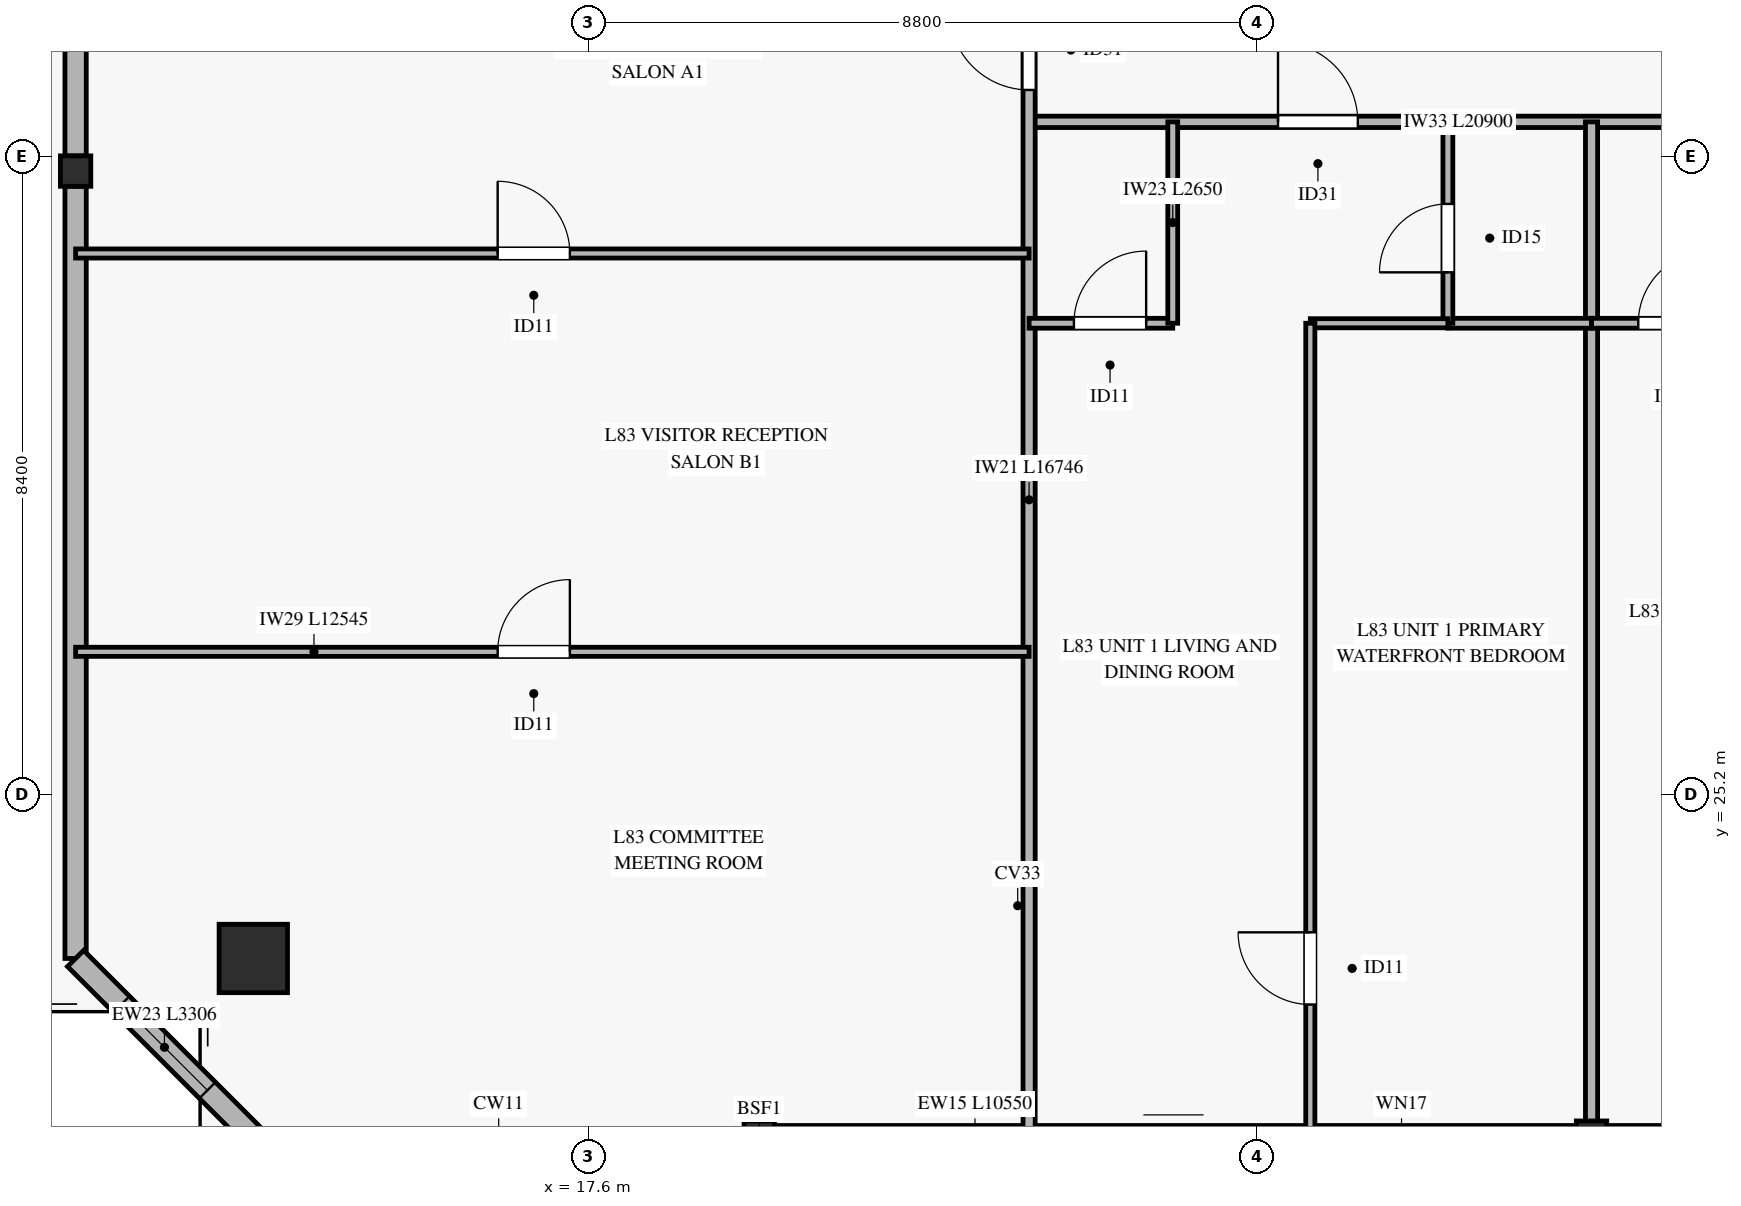
"""IFC4 building model, lengths in metres.
Left out: names, types, materials, properties, quantities, classifications, styles, units other than length and angle.
Written with IfcOpenShell. Run it as: python <this file> out.ifc"""

import sys

from ifc_helpers import new_model, si_unit, direction, frame, frame_2d, origin, origin_2d, place, context, subcontext, project, spatial, rectangle, hollow_rectangle, extrude, source, transform, mapped, element, fill, save


model = new_model("IFC4")
c1 = context("Model", 3, precision=1e-05, world=origin(), true_north=direction((0.0, 1.0)))
c2 = subcontext(c1, "Body", "Model", "MODEL_VIEW")
j1 = project(units=[si_unit("LENGTHUNIT", "METRE"), si_unit("PLANEANGLEUNIT", "RADIAN")], contexts=[c1])
p1 = place(None, origin())
s1 = spatial("IfcSite", under=j1, at=p1, CompositionType="ELEMENT")
p2 = place(p1, origin())
s2 = spatial("IfcBuilding", under=s1, at=p2, CompositionType="ELEMENT")
p3 = place(p2, frame((0.0, 0.0, 321.0)))
s3 = spatial("IfcBuildingStorey", under=s2, at=p3, CompositionType="ELEMENT", Elevation=321.0)
m1 = source(origin(), c2, "Body", "SweptSolid", [
    extrude(hollow_rectangle(XDim=0.9, YDim=0.9, WallThickness=0.04, at=origin_2d()), origin(), (0.0, 0.0, 1.0), 3.326),
])
p4 = place(p3, frame((13.193, 23.042, 0.0), z_axis=(0.110896020197, 0.266341268892, 0.957478146586), x_axis=(-0.92317473482, 0.384380552305, 0.0)))
e1 = element("IfcColumn", 1, at=p4, inside=s3, PredefinedType="COLUMN", context=c2, shape_type="MappedRepresentation", body=[
    mapped(m1, transform((0.0, 0.0, 0.0), x_axis=(1.0, 0.0, 0.0), y_axis=(0.0, 1.0, 0.0), z_axis=(0.0, 0.0, 1.0), scale=1.0)),
])
m2 = source(origin(), c2, "Body", "SweptSolid", [
    extrude(hollow_rectangle(XDim=0.4, YDim=0.4, WallThickness=0.02, at=origin_2d()), origin(), (0.0, 0.0, 1.0), 3.319),
])
for number, where, z_axis, x_axis in (
    (2, (19.85, 20.704, 0.0), (0.0, 0.281, 0.96), (-1.0, 0.0, 0.0)),
    (3, (30.8, 20.704, 0.0), (0.0, 0.281, 0.96), (-1.0, 0.0, 0.0)),
):
    element("IfcColumn", number, at=place(p3, frame(where, z_axis=z_axis, x_axis=x_axis)), inside=s3, PredefinedType="COLUMN", context=c2, shape_type="MappedRepresentation", body=[
        mapped(m2, transform((0.0, 0.0, 0.0), x_axis=(1.0, 0.0, 0.0), y_axis=(0.0, 1.0, 0.0), z_axis=(0.0, 0.0, 1.0), scale=1.0)),
    ])
m3 = source(origin(), c2, "Body", "SweptSolid", [
    extrude(hollow_rectangle(XDim=0.4, YDim=0.4, WallThickness=0.02, at=origin_2d()), origin(), (0.0, 0.0, 1.0), 3.246),
])
p5 = place(p3, frame((10.855, 33.402, 0.0), z_axis=(0.127877909332, 0.14352414765, 0.981350120674), x_axis=(-0.746631572004, 0.665237773798, 0.0)))
e4 = element("IfcColumn", 4, at=p5, inside=s3, PredefinedType="COLUMN", context=c2, shape_type="MappedRepresentation", body=[
    mapped(m3, transform((0.0, 0.0, 0.0), x_axis=(1.0, 0.0, 0.0), y_axis=(0.0, 1.0, 0.0), z_axis=(0.0, 0.0, 1.0), scale=1.0)),
])
p6 = place(p3, frame((20.05, 20.704, 0.0), z_axis=(0.0, 0.0, 1.0), x_axis=(1.0, 0.0, 0.0)))
e5 = element("IfcWall", 5, at=p6, inside=s3, PredefinedType="SOLIDWALL", context=c2, shape_type="SweptSolid", body=[
    extrude(rectangle(XDim=10.55, YDim=0.28, at=frame_2d((5.275, 0.0))), origin(), (0.0, 0.0, 1.0), 2.815),
])
p7 = place(p6, frame((4.35, 0.0, 0.0)))
e6 = element("IfcOpeningElement", 6, at=p7, cuts=e5, PredefinedType="OPENING", context=c2, shape_type="SweptSolid", body=[
    extrude(rectangle(XDim=1.8, YDim=2.25, at=frame_2d((0.9, 1.125))), frame((0.0, 0.15, 0.0), z_axis=(0.0, -1.0, 0.0), x_axis=(1.0, 0.0, 0.0)), (0.0, 0.0, 1.0), 0.3),
])
p8 = place(p6, frame((0.65, 0.0, 0.45)))
e7 = element("IfcOpeningElement", 7, at=p8, cuts=e5, PredefinedType="OPENING", context=c2, shape_type="SweptSolid", body=[
    extrude(rectangle(XDim=2.2, YDim=2.1, at=frame_2d((1.1, 1.05))), frame((0.0, 0.15, 0.0), z_axis=(0.0, -1.0, 0.0), x_axis=(1.0, 0.0, 0.0)), (0.0, 0.0, 1.0), 0.3),
])
p9 = place(p6, frame((7.45, 0.0, 0.45)))
e8 = element("IfcOpeningElement", 8, at=p9, cuts=e5, PredefinedType="OPENING", context=c2, shape_type="SweptSolid", body=[
    extrude(rectangle(XDim=1.6, YDim=2.0, at=frame_2d((0.8, 1.0))), frame((0.0, 0.15, 0.0), z_axis=(0.0, -1.0, 0.0), x_axis=(1.0, 0.0, 0.0)), (0.0, 0.0, 1.0), 0.3),
])
p10 = place(p3, frame((31.0, 20.704, 0.0), z_axis=(0.0, 0.0, 1.0), x_axis=(1.0, 0.0, 0.0)))
e9 = element("IfcWall", 9, at=p10, inside=s3, PredefinedType="SOLIDWALL", context=c2, shape_type="SweptSolid", body=[
    extrude(rectangle(XDim=6.35, YDim=0.28, at=frame_2d((3.175, 0.0))), origin(), (0.0, 0.0, 1.0), 2.815),
])
p11 = place(p3, frame((10.855, 23.042, 0.0), z_axis=(0.0, 0.0, 1.0), x_axis=(0.0, 1.0, 0.0)))
e10 = element("IfcWall", 10, at=p11, inside=s3, PredefinedType="SOLIDWALL", context=c2, shape_type="SweptSolid", body=[
    extrude(rectangle(XDim=10.16, YDim=0.28, at=frame_2d((5.08, 0.0))), origin(), (0.0, 0.0, 1.0), 2.815),
])
p12 = place(p3, frame((10.855, 33.602, 0.0), z_axis=(0.0, 0.0, 1.0), x_axis=(0.0, 1.0, 0.0)))
e11 = element("IfcWall", 11, at=p12, inside=s3, PredefinedType="SOLIDWALL", context=c2, shape_type="SweptSolid", body=[
    extrude(rectangle(XDim=10.16, YDim=0.28, at=frame_2d((5.08, 0.0))), origin(), (0.0, 0.0, 1.0), 2.815),
])
p13 = place(p12, frame((4.253, 0.0, 0.45)))
e12 = element("IfcOpeningElement", 12, at=p13, cuts=e11, PredefinedType="OPENING", context=c2, shape_type="SweptSolid", body=[
    extrude(rectangle(XDim=2.2, YDim=2.1, at=frame_2d((1.1, 1.05))), frame((0.0, 0.15, 0.0), z_axis=(0.0, -1.0, 0.0), x_axis=(1.0, 0.0, 0.0)), (0.0, 0.0, 1.0), 0.3),
])
p14 = place(p3, frame((10.855, 23.042, 0.0), z_axis=(0.0, 0.0, 1.0), x_axis=(0.707143699075, -0.70706986137, 0.0)))
e13 = element("IfcWall", 13, at=p14, inside=s3, PredefinedType="SOLIDWALL", context=c2, shape_type="SweptSolid", body=[
    extrude(rectangle(XDim=3.306, YDim=0.3, at=frame_2d((1.653, 0.0))), origin(), (0.0, 0.0, 1.0), 2.815),
])
p15 = place(p14, frame((0.853, 0.0, 0.45)))
e14 = element("IfcOpeningElement", 14, at=p15, cuts=e13, PredefinedType="OPENING", context=c2, shape_type="SweptSolid", body=[
    extrude(rectangle(XDim=1.6, YDim=2.0, at=frame_2d((0.8, 1.0))), frame((0.0, 0.16, 0.0), z_axis=(0.0, -1.0, 0.0), x_axis=(1.0, 0.0, 0.0)), (0.0, 0.0, 1.0), 0.32),
])
p16 = place(p3, frame((23.4, 34.05, 0.0), z_axis=(0.0, 0.0, 1.0), x_axis=(1.0, 0.0, 0.0)))
e15 = element("IfcWall", 15, at=p16, inside=s3, PredefinedType="PARTITIONING", context=c2, shape_type="SweptSolid", body=[
    extrude(rectangle(XDim=20.9, YDim=0.15, at=frame_2d((10.45, 0.0))), origin(), (0.0, 0.0, 1.0), 2.47),
])
p17 = place(p16, frame((3.275, 0.0, 0.0)))
e16 = element("IfcOpeningElement", 16, at=p17, cuts=e15, PredefinedType="OPENING", context=c2, shape_type="SweptSolid", body=[
    extrude(rectangle(XDim=1.05, YDim=2.15, at=frame_2d((0.525, 1.075))), frame((0.0, 0.085, 0.0), z_axis=(0.0, -1.0, 0.0), x_axis=(1.0, 0.0, 0.0)), (0.0, 0.0, 1.0), 0.17),
])
p18 = place(p16, frame((10.775, 0.0, 0.0)))
e17 = element("IfcOpeningElement", 17, at=p18, cuts=e15, PredefinedType="OPENING", context=c2, shape_type="SweptSolid", body=[
    extrude(rectangle(XDim=1.05, YDim=2.15, at=frame_2d((0.525, 1.075))), frame((0.0, 0.085, 0.0), z_axis=(0.0, -1.0, 0.0), x_axis=(1.0, 0.0, 0.0)), (0.0, 0.0, 1.0), 0.17),
])
p19 = place(p16, frame((17.525, 0.0, 0.0)))
e18 = element("IfcOpeningElement", 18, at=p19, cuts=e15, PredefinedType="OPENING", context=c2, shape_type="SweptSolid", body=[
    extrude(rectangle(XDim=1.05, YDim=2.15, at=frame_2d((0.525, 1.075))), frame((0.0, 0.085, 0.0), z_axis=(0.0, -1.0, 0.0), x_axis=(1.0, 0.0, 0.0)), (0.0, 0.0, 1.0), 0.17),
])
p20 = place(p3, frame((23.4, 20.704, 0.0), z_axis=(0.0, 0.0, 1.0), x_axis=(0.0, 1.0, 0.0)))
e19 = element("IfcWall", 19, at=p20, inside=s3, PredefinedType="PARTITIONING", context=c2, shape_type="SweptSolid", body=[
    extrude(rectangle(XDim=16.746, YDim=0.16, at=frame_2d((8.373, 0.0))), origin(), (0.0, 0.0, 1.0), 2.77),
])
p21 = place(p20, frame((13.766, 0.0, 0.0)))
e20 = element("IfcOpeningElement", 20, at=p21, cuts=e19, PredefinedType="OPENING", context=c2, shape_type="SweptSolid", body=[
    extrude(rectangle(XDim=1.05, YDim=2.15, at=frame_2d((0.525, 1.075))), frame((0.0, 0.09, 0.0), z_axis=(0.0, -1.0, 0.0), x_axis=(1.0, 0.0, 0.0)), (0.0, 0.0, 1.0), 0.18),
])
p22 = place(p3, frame((30.8, 20.704, 0.0), z_axis=(0.0, 0.0, 1.0), x_axis=(0.0, 1.0, 0.0)))
e21 = element("IfcWall", 21, at=p22, inside=s3, PredefinedType="PARTITIONING", context=c2, shape_type="SweptSolid", body=[
    extrude(rectangle(XDim=13.346, YDim=0.16, at=frame_2d((6.673, 0.0))), origin(), (0.0, 0.0, 1.0), 2.47),
])
p23 = place(p3, frame((10.855, 27.077, 0.0), z_axis=(0.0, 0.0, 1.0), x_axis=(1.0, 0.0, 0.0)))
e22 = element("IfcWall", 22, at=p23, inside=s3, PredefinedType="PARTITIONING", context=c2, shape_type="SweptSolid", body=[
    extrude(rectangle(XDim=12.545, YDim=0.12, at=frame_2d((6.272, 0.0))), origin(), (0.0, 0.0, 1.0), 2.47),
])
p24 = place(p23, frame((5.553, 0.0, 0.0)))
e23 = element("IfcOpeningElement", 23, at=p24, cuts=e22, PredefinedType="OPENING", context=c2, shape_type="SweptSolid", body=[
    extrude(rectangle(XDim=0.95, YDim=2.1, at=frame_2d((0.475, 1.05))), frame((0.0, 0.07, 0.0), z_axis=(0.0, -1.0, 0.0), x_axis=(1.0, 0.0, 0.0)), (0.0, 0.0, 1.0), 0.14),
])
p25 = place(p3, frame((10.855, 32.318, 0.0), z_axis=(0.0, 0.0, 1.0), x_axis=(1.0, 0.0, 0.0)))
e24 = element("IfcWall", 24, at=p25, inside=s3, PredefinedType="PARTITIONING", context=c2, shape_type="SweptSolid", body=[
    extrude(rectangle(XDim=12.545, YDim=0.12, at=frame_2d((6.272, 0.0))), origin(), (0.0, 0.0, 1.0), 2.47),
])
p26 = place(p25, frame((5.553, 0.0, 0.0)))
e25 = element("IfcOpeningElement", 25, at=p26, cuts=e24, PredefinedType="OPENING", context=c2, shape_type="SweptSolid", body=[
    extrude(rectangle(XDim=0.95, YDim=2.1, at=frame_2d((0.475, 1.05))), frame((0.0, 0.07, 0.0), z_axis=(0.0, -1.0, 0.0), x_axis=(1.0, 0.0, 0.0)), (0.0, 0.0, 1.0), 0.14),
])
p27 = place(p3, frame((23.4, 31.4, 0.0), z_axis=(0.0, 0.0, 1.0), x_axis=(1.0, 0.0, 0.0)))
e26 = element("IfcWall", 26, at=p27, inside=s3, PredefinedType="PARTITIONING", context=c2, shape_type="SweptSolid", body=[
    extrude(rectangle(XDim=1.89, YDim=0.13, at=frame_2d((0.945, 0.0))), origin(), (0.0, 0.0, 1.0), 3.185),
])
p28 = place(p27, frame((0.59, 0.0, 0.0)))
e27 = element("IfcOpeningElement", 27, at=p28, cuts=e26, PredefinedType="OPENING", context=c2, shape_type="SweptSolid", body=[
    extrude(rectangle(XDim=0.95, YDim=2.1, at=frame_2d((0.475, 1.05))), frame((0.0, 0.075, 0.0), z_axis=(0.0, -1.0, 0.0), x_axis=(1.0, 0.0, 0.0)), (0.0, 0.0, 1.0), 0.15),
])
p29 = place(p3, frame((25.29, 31.4, 0.0), z_axis=(0.0, 0.0, 1.0), x_axis=(0.0, 1.0, 0.0)))
e28 = element("IfcWall", 28, at=p29, inside=s3, PredefinedType="PARTITIONING", context=c2, shape_type="SweptSolid", body=[
    extrude(rectangle(XDim=2.65, YDim=0.13, at=frame_2d((1.325, 0.0))), origin(), (0.0, 0.0, 1.0), 2.77),
])
p30 = place(p3, frame((28.91, 31.4, 0.0), z_axis=(0.0, 0.0, 1.0), x_axis=(1.0, 0.0, 0.0)))
e29 = element("IfcWall", 29, at=p30, inside=s3, PredefinedType="PARTITIONING", context=c2, shape_type="SweptSolid", body=[
    extrude(rectangle(XDim=1.89, YDim=0.13, at=frame_2d((0.945, 0.0))), origin(), (0.0, 0.0, 1.0), 2.47),
])
p31 = place(p3, frame((28.91, 31.4, 0.0), z_axis=(0.0, 0.0, 1.0), x_axis=(0.0, 1.0, 0.0)))
e30 = element("IfcWall", 30, at=p31, inside=s3, PredefinedType="PARTITIONING", context=c2, shape_type="SweptSolid", body=[
    extrude(rectangle(XDim=2.65, YDim=0.13, at=frame_2d((1.325, 0.0))), origin(), (0.0, 0.0, 1.0), 2.77),
])
p32 = place(p31, frame((0.67, 0.0, 0.0)))
e31 = element("IfcOpeningElement", 31, at=p32, cuts=e30, PredefinedType="OPENING", context=c2, shape_type="SweptSolid", body=[
    extrude(rectangle(XDim=0.9, YDim=2.1, at=frame_2d((0.45, 1.05))), frame((0.0, 0.075, 0.0), z_axis=(0.0, -1.0, 0.0), x_axis=(1.0, 0.0, 0.0)), (0.0, 0.0, 1.0), 0.15),
])
p33 = place(p3, frame((27.1, 31.4, 0.0), z_axis=(0.0, 0.0, 1.0), x_axis=(1.0, 0.0, 0.0)))
e32 = element("IfcWall", 32, at=p33, inside=s3, PredefinedType="PARTITIONING", context=c2, shape_type="SweptSolid", body=[
    extrude(rectangle(XDim=1.81, YDim=0.12, at=frame_2d((0.905, 0.0))), origin(), (0.0, 0.0, 1.0), 3.185),
])
p34 = place(p3, frame((27.1, 20.704, 0.0), z_axis=(0.0, 0.0, 1.0), x_axis=(0.0, 1.0, 0.0)))
e33 = element("IfcWall", 33, at=p34, inside=s3, PredefinedType="PARTITIONING", context=c2, shape_type="SweptSolid", body=[
    extrude(rectangle(XDim=10.696, YDim=0.12, at=frame_2d((5.348, 0.0))), origin(), (0.0, 0.0, 1.0), 2.77),
])
p35 = place(p34, frame((1.732, 0.0, 0.0)))
e34 = element("IfcOpeningElement", 34, at=p35, cuts=e33, PredefinedType="OPENING", context=c2, shape_type="SweptSolid", body=[
    extrude(rectangle(XDim=0.95, YDim=2.1, at=frame_2d((0.475, 1.05))), frame((0.0, 0.07, 0.0), z_axis=(0.0, -1.0, 0.0), x_axis=(1.0, 0.0, 0.0)), (0.0, 0.0, 1.0), 0.14),
])
p36 = place(p3, frame((30.8, 31.4, 0.0), z_axis=(0.0, 0.0, 1.0), x_axis=(1.0, 0.0, 0.0)))
e35 = element("IfcWall", 35, at=p36, inside=s3, PredefinedType="PARTITIONING", context=c2, shape_type="SweptSolid", body=[
    extrude(rectangle(XDim=1.94, YDim=0.13, at=frame_2d((0.97, 0.0))), origin(), (0.0, 0.0, 1.0), 2.47),
])
p37 = place(p36, frame((0.615, 0.0, 0.0)))
e36 = element("IfcOpeningElement", 36, at=p37, cuts=e35, PredefinedType="OPENING", context=c2, shape_type="SweptSolid", body=[
    extrude(rectangle(XDim=0.95, YDim=2.1, at=frame_2d((0.475, 1.05))), frame((0.0, 0.075, 0.0), z_axis=(0.0, -1.0, 0.0), x_axis=(1.0, 0.0, 0.0)), (0.0, 0.0, 1.0), 0.15),
])
m4 = source(origin(), c2, "Body", "SweptSolid", [
    extrude(rectangle(XDim=1.6, YDim=2.0, at=frame_2d((0.8, 1.0))), frame((0.0, 0.03, 0.0), z_axis=(0.0, -1.0, 0.0), x_axis=(1.0, 0.0, 0.0)), (0.0, 0.0, 1.0), 0.06),
])
p38 = place(p15, origin())
e37 = element("IfcWindow", 37, at=p38, inside=s3, PartitioningType="SINGLE_PANEL", PredefinedType="WINDOW", context=c2, shape_type="MappedRepresentation", body=[
    mapped(m4, transform((0.0, 0.0, 0.0), x_axis=(1.0, 0.0, 0.0), y_axis=(0.0, 1.0, 0.0), z_axis=(0.0, 0.0, 1.0), scale=1.0)),
])
fill(e14, e37)
m5 = source(origin(), c2, "Body", "SweptSolid", [
    extrude(rectangle(XDim=1.05, YDim=2.15, at=frame_2d((0.525, 1.075))), frame((0.0, 0.025, 0.0), z_axis=(0.0, -1.0, 0.0), x_axis=(1.0, 0.0, 0.0)), (0.0, 0.0, 1.0), 0.05),
])
p39 = place(p21, origin())
e38 = element("IfcDoor", 38, at=p39, inside=s3, OperationType="SINGLE_SWING_RIGHT", PredefinedType="DOOR", context=c2, shape_type="MappedRepresentation", body=[
    mapped(m5, transform((0.0, 0.0, 0.0), x_axis=(1.0, 0.0, 0.0), y_axis=(0.0, 1.0, 0.0), z_axis=(0.0, 0.0, 1.0), scale=1.0)),
])
fill(e20, e38)
m6 = source(origin(), c2, "Body", "SweptSolid", [
    extrude(rectangle(XDim=0.95, YDim=2.1, at=frame_2d((0.475, 1.05))), frame((0.0, 0.025, 0.0), z_axis=(0.0, -1.0, 0.0), x_axis=(1.0, 0.0, 0.0)), (0.0, 0.0, 1.0), 0.05),
])
p40 = place(p26, origin())
e39 = element("IfcDoor", 39, at=p40, inside=s3, OperationType="SINGLE_SWING_LEFT", PredefinedType="DOOR", context=c2, shape_type="MappedRepresentation", body=[
    mapped(m6, transform((0.0, 0.0, 0.0), x_axis=(1.0, 0.0, 0.0), y_axis=(0.0, 1.0, 0.0), z_axis=(0.0, 0.0, 1.0), scale=1.0)),
])
fill(e25, e39)
p41 = place(p24, origin())
e40 = element("IfcDoor", 40, at=p41, inside=s3, OperationType="SINGLE_SWING_RIGHT", PredefinedType="DOOR", context=c2, shape_type="MappedRepresentation", body=[
    mapped(m6, transform((0.0, 0.0, 0.0), x_axis=(1.0, 0.0, 0.0), y_axis=(0.0, 1.0, 0.0), z_axis=(0.0, 0.0, 1.0), scale=1.0)),
])
fill(e23, e40)
p42 = place(p17, origin())
e41 = element("IfcDoor", 41, at=p42, inside=s3, OperationType="SINGLE_SWING_LEFT", PredefinedType="DOOR", context=c2, shape_type="MappedRepresentation", body=[
    mapped(m5, transform((0.0, 0.0, 0.0), x_axis=(1.0, 0.0, 0.0), y_axis=(0.0, 1.0, 0.0), z_axis=(0.0, 0.0, 1.0), scale=1.0)),
])
fill(e16, e41)
p43 = place(p28, origin())
e42 = element("IfcDoor", 42, at=p43, inside=s3, OperationType="SINGLE_SWING_RIGHT", PredefinedType="DOOR", context=c2, shape_type="MappedRepresentation", body=[
    mapped(m6, transform((0.0, 0.0, 0.0), x_axis=(1.0, 0.0, 0.0), y_axis=(0.0, 1.0, 0.0), z_axis=(0.0, 0.0, 1.0), scale=1.0)),
])
fill(e27, e42)
m7 = source(origin(), c2, "Body", "SweptSolid", [
    extrude(rectangle(XDim=0.9, YDim=2.1, at=frame_2d((0.45, 1.05))), frame((0.0, 0.025, 0.0), z_axis=(0.0, -1.0, 0.0), x_axis=(1.0, 0.0, 0.0)), (0.0, 0.0, 1.0), 0.05),
])
p44 = place(p32, origin())
e43 = element("IfcDoor", 43, at=p44, inside=s3, OperationType="SINGLE_SWING_LEFT", PredefinedType="DOOR", context=c2, shape_type="MappedRepresentation", body=[
    mapped(m7, transform((0.0, 0.0, 0.0), x_axis=(1.0, 0.0, 0.0), y_axis=(0.0, 1.0, 0.0), z_axis=(0.0, 0.0, 1.0), scale=1.0)),
])
fill(e31, e43)
p45 = place(p35, origin())
e44 = element("IfcDoor", 44, at=p45, inside=s3, OperationType="SINGLE_SWING_RIGHT", PredefinedType="DOOR", context=c2, shape_type="MappedRepresentation", body=[
    mapped(m6, transform((0.0, 0.0, 0.0), x_axis=(1.0, 0.0, 0.0), y_axis=(0.0, 1.0, 0.0), z_axis=(0.0, 0.0, 1.0), scale=1.0)),
])
fill(e34, e44)
p46 = place(p37, origin())
e45 = element("IfcDoor", 45, at=p46, inside=s3, OperationType="SINGLE_SWING_RIGHT", PredefinedType="DOOR", context=c2, shape_type="MappedRepresentation", body=[
    mapped(m6, transform((0.0, 0.0, 0.0), x_axis=(1.0, 0.0, 0.0), y_axis=(0.0, 1.0, 0.0), z_axis=(0.0, 0.0, 1.0), scale=1.0)),
])
fill(e36, e45)
save(model, sys.argv[1])
